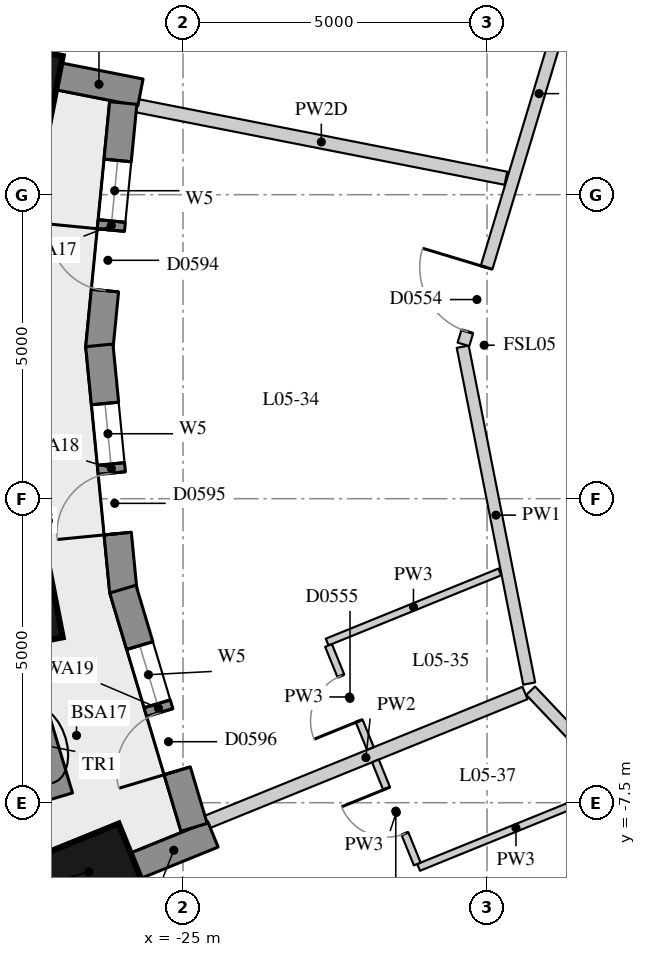
"""IFC4 building model, lengths in metres.
Left out: names, types, materials, properties, quantities, classifications, styles, units other than length and angle.
Written with IfcOpenShell. Run it as: python <this file> out.ifc"""

import sys

from ifc_helpers import new_model, si_unit, direction, frame, frame_2d, origin, origin_2d, place, context, subcontext, project, spatial, rectangle, extrude, element, fill, save


model = new_model("IFC4")
c1 = context("Model", 3, precision=1e-05, world=origin(), true_north=direction((0.0, 1.0)))
c2 = subcontext(c1, "Body", "Model", "MODEL_VIEW")
j1 = project(units=[si_unit("LENGTHUNIT", "METRE"), si_unit("PLANEANGLEUNIT", "RADIAN")], contexts=[c1])
p1 = place(None, origin())
s1 = spatial("IfcSite", under=j1, at=p1, CompositionType="ELEMENT")
p2 = place(p1, origin())
s2 = spatial("IfcBuilding", under=s1, at=p2, CompositionType="ELEMENT")
p3 = place(p2, frame((0.0, 0.0, 25.0)))
s3 = spatial("IfcBuildingStorey", under=s2, at=p3, CompositionType="ELEMENT", Elevation=25.0)
for number, where, z_axis, x_axis in (
    (1, (-27.821, 4.385, 0.0), (0.0, 0.0, 1.0), (-0.981, 0.193, 0.0)),
    (2, (-27.821, -4.385, 0.0), (0.0, 0.0, 1.0), (-0.981, -0.193, 0.0)),
    (3, (-26.546, -8.636, 0.0), (0.0, 0.0, 1.0), (-0.927, -0.376, 0.0)),
):
    element("IfcColumn", number, at=place(p3, frame(where, z_axis=z_axis, x_axis=x_axis)), inside=s3, PredefinedType="COLUMN", context=c2, shape_type="SweptSolid", body=[
        extrude(rectangle(XDim=1.5, YDim=1.1, at=origin_2d()), origin(), (0.0, 0.0, 1.0), 3.3),
    ])
p4 = place(p3, frame((-27.064, 4.45, 0.0), z_axis=(0.0, 0.0, 1.0), x_axis=(0.98123042829, -0.192838913596, 0.0)))
e4 = element("IfcWall", 4, at=p4, inside=s3, PredefinedType="SOLIDWALL", context=c2, shape_type="SweptSolid", body=[
    extrude(rectangle(XDim=1.39, YDim=0.45, at=frame_2d((0.695, 0.0))), origin(), (0.0, 0.0, 1.0), 2.47),
])
p5 = place(p3, frame((-25.796, -8.544, 0.0), z_axis=(0.0, 0.0, 1.0), x_axis=(0.926575599743, 0.376108572039, 0.0)))
e5 = element("IfcWall", 5, at=p5, inside=s3, PredefinedType="SOLIDWALL", context=c2, shape_type="SweptSolid", body=[
    extrude(rectangle(XDim=1.39, YDim=0.45, at=frame_2d((0.695, 0.0))), origin(), (0.0, 0.0, 1.0), 3.02),
])
p6 = place(p3, frame((-25.983, 4.008, 0.0), z_axis=(0.0, 0.0, 1.0), x_axis=(-0.097133468736, -0.995271364629, 0.0)))
e6 = element("IfcWall", 6, at=p6, inside=s3, PredefinedType="SOLIDWALL", context=c2, shape_type="SweptSolid", body=[
    extrude(rectangle(XDim=4.049, YDim=0.45, at=frame_2d((2.024, 0.0))), origin(), (0.0, 0.0, 1.0), 3.02),
])
p7 = place(p6, frame((0.949, 0.0, 0.4)))
e7 = element("IfcOpeningElement", 7, at=p7, cuts=e6, PredefinedType="OPENING", context=c2, shape_type="SweptSolid", body=[
    extrude(rectangle(XDim=1.0, YDim=1.75, at=frame_2d((0.5, 0.875))), frame((0.0, 0.235, 0.0), z_axis=(0.0, -1.0, 0.0), x_axis=(1.0, 0.0, 0.0)), (0.0, 0.0, 1.0), 0.47),
])
p8 = place(p6, frame((2.1, 0.0, 0.0)))
e8 = element("IfcOpeningElement", 8, at=p8, cuts=e6, PredefinedType="OPENING", context=c2, shape_type="SweptSolid", body=[
    extrude(rectangle(XDim=1.0, YDim=2.15, at=frame_2d((0.5, 1.075))), frame((0.0, 0.235, 0.0), z_axis=(0.0, -1.0, 0.0), x_axis=(1.0, 0.0, 0.0)), (0.0, 0.0, 1.0), 0.47),
])
p9 = place(p3, frame((-26.376, 0.022, 0.0), z_axis=(0.0, 0.0, 1.0), x_axis=(0.097092719726, -0.995275340685, 0.0)))
e9 = element("IfcWall", 9, at=p9, inside=s3, PredefinedType="SOLIDWALL", context=c2, shape_type="SweptSolid", body=[
    extrude(rectangle(XDim=4.071, YDim=0.45, at=frame_2d((2.036, 0.0))), origin(), (0.0, 0.0, 1.0), 3.02),
])
p10 = place(p9, frame((0.96, 0.0, 0.4)))
e10 = element("IfcOpeningElement", 10, at=p10, cuts=e9, PredefinedType="OPENING", context=c2, shape_type="SweptSolid", body=[
    extrude(rectangle(XDim=1.0, YDim=1.75, at=frame_2d((0.5, 0.875))), frame((0.0, 0.235, 0.0), z_axis=(0.0, -1.0, 0.0), x_axis=(1.0, 0.0, 0.0)), (0.0, 0.0, 1.0), 0.47),
])
p11 = place(p9, frame((2.111, 0.0, 0.0)))
e11 = element("IfcOpeningElement", 11, at=p11, cuts=e9, PredefinedType="OPENING", context=c2, shape_type="SweptSolid", body=[
    extrude(rectangle(XDim=1.0, YDim=2.15, at=frame_2d((0.5, 1.075))), frame((0.0, 0.235, 0.0), z_axis=(0.0, -1.0, 0.0), x_axis=(1.0, 0.0, 0.0)), (0.0, 0.0, 1.0), 0.47),
])
p12 = place(p3, frame((-25.989, -3.987, 0.0), z_axis=(0.0, 0.0, 1.0), x_axis=(0.286427456555, -0.958101932015, 0.0)))
e12 = element("IfcWall", 12, at=p12, inside=s3, PredefinedType="SOLIDWALL", context=c2, shape_type="SweptSolid", body=[
    extrude(rectangle(XDim=4.089, YDim=0.45, at=frame_2d((2.044, 0.0))), origin(), (0.0, 0.0, 1.0), 3.02),
])
p13 = place(p12, frame((0.969, 0.0, 0.4)))
e13 = element("IfcOpeningElement", 13, at=p13, cuts=e12, PredefinedType="OPENING", context=c2, shape_type="SweptSolid", body=[
    extrude(rectangle(XDim=1.0, YDim=1.75, at=frame_2d((0.5, 0.875))), frame((0.0, 0.235, 0.0), z_axis=(0.0, -1.0, 0.0), x_axis=(1.0, 0.0, 0.0)), (0.0, 0.0, 1.0), 0.47),
])
p14 = place(p12, frame((2.119, 0.0, 0.0)))
e14 = element("IfcOpeningElement", 14, at=p14, cuts=e12, PredefinedType="OPENING", context=c2, shape_type="SweptSolid", body=[
    extrude(rectangle(XDim=1.0, YDim=2.15, at=frame_2d((0.5, 1.075))), frame((0.0, 0.235, 0.0), z_axis=(0.0, -1.0, 0.0), x_axis=(1.0, 0.0, 0.0)), (0.0, 0.0, 1.0), 0.47),
])
p15 = place(p3, frame((-27.669, -5.715, 0.0), z_axis=(0.0, 0.0, 1.0), x_axis=(0.287024312863, -0.957923297465, 0.0)))
e15 = element("IfcWall", 15, at=p15, inside=s3, PredefinedType="USERDEFINED", context=c2, shape_type="SweptSolid", body=[
    extrude(rectangle(XDim=1.8, YDim=0.7, at=frame_2d((0.9, 0.0))), origin(), (0.0, 0.0, 1.0), 0.75),
])
p16 = place(p3, frame((-16.141, -8.974, 0.0), z_axis=(0.0, 0.0, 1.0), x_axis=(-0.687741683024, 0.725955492735, 0.0)))
e16 = element("IfcWall", 16, at=p16, inside=s3, PredefinedType="PARTITIONING", context=c2, shape_type="SweptSolid", body=[
    extrude(rectangle(XDim=4.568, YDim=0.2, at=frame_2d((2.284, 0.0))), origin(), (0.0, 0.0, 1.0), 3.02),
])
p17 = place(p3, frame((-19.306, -5.541, 0.0), z_axis=(0.0, 0.0, 1.0), x_axis=(-0.193671356151, 0.981066463501, 0.0)))
e17 = element("IfcWall", 17, at=p17, inside=s3, PredefinedType="PARTITIONING", context=c2, shape_type="SweptSolid", body=[
    extrude(rectangle(XDim=5.647, YDim=0.2, at=frame_2d((2.824, 0.0))), origin(), (0.0, 0.0, 1.0), 3.02),
])
p18 = place(p3, frame((-20.388, 0.038, 0.0), z_axis=(0.0, 0.0, 1.0), x_axis=(0.288600779805, 0.957449523419, 0.0)))
e18 = element("IfcWall", 18, at=p18, inside=s3, PredefinedType="PARTITIONING", context=c2, shape_type="SweptSolid", body=[
    extrude(rectangle(XDim=8.615, YDim=0.2, at=frame_2d((4.308, 0.0))), origin(), (0.0, 0.0, 1.0), 3.02),
])
p19 = place(p18, frame((7.295, 0.0, 0.0)))
e19 = element("IfcOpeningElement", 19, at=p19, cuts=e18, PredefinedType="OPENING", context=c2, shape_type="SweptSolid", body=[
    extrude(rectangle(XDim=1.1, YDim=2.1, at=frame_2d((0.55, 1.05))), frame((0.0, 0.11, 0.0), z_axis=(0.0, -1.0, 0.0), x_axis=(1.0, 0.0, 0.0)), (0.0, 0.0, 1.0), 0.22),
])
p20 = place(p18, frame((0.22, 0.0, 0.0)))
e20 = element("IfcOpeningElement", 20, at=p20, cuts=e18, PredefinedType="OPENING", context=c2, shape_type="SweptSolid", body=[
    extrude(rectangle(XDim=1.1, YDim=2.1, at=frame_2d((0.55, 1.05))), frame((0.0, 0.11, 0.0), z_axis=(0.0, -1.0, 0.0), x_axis=(1.0, 0.0, 0.0)), (0.0, 0.0, 1.0), 0.22),
])
p21 = place(p3, frame((-25.761, 3.964, 0.0), z_axis=(0.0, 0.0, 1.0), x_axis=(0.981209888948, -0.192943395406, 0.0)))
e21 = element("IfcWall", 21, at=p21, inside=s3, PredefinedType="PARTITIONING", context=c2, shape_type="SweptSolid", body=[
    extrude(rectangle(XDim=6.188, YDim=0.22, at=frame_2d((3.094, 0.0))), origin(), (0.0, 0.0, 1.0), 2.47),
])
p22 = place(p3, frame((-24.608, -7.82, 0.0), z_axis=(0.0, 0.0, 1.0), x_axis=(0.926565467624, 0.376133532415, 0.0)))
e22 = element("IfcWall", 22, at=p22, inside=s3, PredefinedType="PARTITIONING", context=c2, shape_type="SweptSolid", body=[
    extrude(rectangle(XDim=5.648, YDim=0.22, at=frame_2d((2.824, 0.0))), origin(), (0.0, 0.0, 1.0), 3.02),
])
p23 = place(p3, frame((-19.79, -3.705, 0.0), z_axis=(0.0, 0.0, 1.0), x_axis=(-0.926585481443, -0.37608422671, 0.0)))
e23 = element("IfcWall", 23, at=p23, inside=s3, PredefinedType="PARTITIONING", context=c2, shape_type="SweptSolid", body=[
    extrude(rectangle(XDim=3.064, YDim=0.12, at=frame_2d((1.532, 0.0))), origin(), (0.0, 0.0, 1.0), 3.02),
])
p24 = place(p3, frame((-17.924, -7.264, 0.0), z_axis=(0.0, 0.0, 1.0), x_axis=(-0.926548953408, -0.376174210891, 0.0)))
e24 = element("IfcWall", 24, at=p24, inside=s3, PredefinedType="PARTITIONING", context=c2, shape_type="SweptSolid", body=[
    extrude(rectangle(XDim=3.455, YDim=0.12, at=frame_2d((1.727, 0.0))), origin(), (0.0, 0.0, 1.0), 3.02),
])
p25 = place(p3, frame((-22.607, -4.913, 0.0), z_axis=(0.0, 0.0, 1.0), x_axis=(0.376216010002, -0.92653198208, 0.0)))
e25 = element("IfcWall", 25, at=p25, inside=s3, PredefinedType="PARTITIONING", context=c2, shape_type="SweptSolid", body=[
    extrude(rectangle(XDim=1.83, YDim=0.12, at=frame_2d((0.915, 0.0))), origin(), (0.0, 0.0, 1.0), 3.02),
])
p26 = place(p25, frame((0.54, 0.0, 0.0)))
e26 = element("IfcOpeningElement", 26, at=p26, cuts=e25, PredefinedType="OPENING", context=c2, shape_type="SweptSolid", body=[
    extrude(rectangle(XDim=0.8, YDim=2.1, at=frame_2d((0.4, 1.05))), frame((0.0, 0.07, 0.0), z_axis=(0.0, -1.0, 0.0), x_axis=(1.0, 0.0, 0.0)), (0.0, 0.0, 1.0), 0.14),
])
p27 = place(p3, frame((-21.147, -8.508, 0.0), z_axis=(0.0, 0.0, 1.0), x_axis=(-0.376216010002, 0.92653198208, 0.0)))
e27 = element("IfcWall", 27, at=p27, inside=s3, PredefinedType="PARTITIONING", context=c2, shape_type="SweptSolid", body=[
    extrude(rectangle(XDim=1.83, YDim=0.12, at=frame_2d((0.915, 0.0))), origin(), (0.0, 0.0, 1.0), 3.02),
])
p28 = place(p27, frame((0.54, 0.0, 0.0)))
e28 = element("IfcOpeningElement", 28, at=p28, cuts=e27, PredefinedType="OPENING", context=c2, shape_type="SweptSolid", body=[
    extrude(rectangle(XDim=0.8, YDim=2.1, at=frame_2d((0.4, 1.05))), frame((0.0, 0.07, 0.0), z_axis=(0.0, -1.0, 0.0), x_axis=(1.0, 0.0, 0.0)), (0.0, 0.0, 1.0), 0.14),
])
p29 = place(p7, origin())
e29 = element("IfcWindow", 29, at=p29, inside=s3, PartitioningType="SINGLE_PANEL", PredefinedType="WINDOW", context=c2, shape_type="SweptSolid", body=[
    extrude(rectangle(XDim=1.0, YDim=1.75, at=frame_2d((0.5, 0.875))), frame((0.0, 0.035, 0.0), z_axis=(0.0, -1.0, 0.0), x_axis=(1.0, 0.0, 0.0)), (0.0, 0.0, 1.0), 0.06),
])
fill(e7, e29)
p30 = place(p8, frame((1.0, 0.0, 0.0), z_axis=(0.0, 0.0, 1.0), x_axis=(-1.0, 0.0, 0.0)))
e30 = element("IfcDoor", 30, at=p30, inside=s3, OperationType="SINGLE_SWING_RIGHT", PredefinedType="DOOR", context=c2, shape_type="SweptSolid", body=[
    extrude(rectangle(XDim=1.0, YDim=2.15, at=frame_2d((0.5, 1.075))), frame((0.0, 0.075, 0.0), z_axis=(0.0, -1.0, 0.0), x_axis=(1.0, 0.0, 0.0)), (0.0, 0.0, 1.0), 0.05),
])
fill(e8, e30)
p31 = place(p10, origin())
e31 = element("IfcWindow", 31, at=p31, inside=s3, PartitioningType="SINGLE_PANEL", PredefinedType="WINDOW", context=c2, shape_type="SweptSolid", body=[
    extrude(rectangle(XDim=1.0, YDim=1.75, at=frame_2d((0.5, 0.875))), frame((0.0, 0.035, 0.0), z_axis=(0.0, -1.0, 0.0), x_axis=(1.0, 0.0, 0.0)), (0.0, 0.0, 1.0), 0.06),
])
fill(e10, e31)
p32 = place(p11, frame((1.0, 0.0, 0.0), z_axis=(0.0, 0.0, 1.0), x_axis=(-1.0, 0.0, 0.0)))
e32 = element("IfcDoor", 32, at=p32, inside=s3, OperationType="SINGLE_SWING_LEFT", PredefinedType="DOOR", context=c2, shape_type="SweptSolid", body=[
    extrude(rectangle(XDim=1.0, YDim=2.15, at=frame_2d((0.5, 1.075))), frame((0.0, 0.075, 0.0), z_axis=(0.0, -1.0, 0.0), x_axis=(1.0, 0.0, 0.0)), (0.0, 0.0, 1.0), 0.05),
])
fill(e11, e32)
p33 = place(p13, origin())
e33 = element("IfcWindow", 33, at=p33, inside=s3, PartitioningType="SINGLE_PANEL", PredefinedType="WINDOW", context=c2, shape_type="SweptSolid", body=[
    extrude(rectangle(XDim=1.0, YDim=1.75, at=frame_2d((0.5, 0.875))), frame((0.0, 0.035, 0.0), z_axis=(0.0, -1.0, 0.0), x_axis=(1.0, 0.0, 0.0)), (0.0, 0.0, 1.0), 0.06),
])
fill(e13, e33)
p34 = place(p14, frame((1.0, 0.0, 0.0), z_axis=(0.0, 0.0, 1.0), x_axis=(-1.0, 0.0, 0.0)))
e34 = element("IfcDoor", 34, at=p34, inside=s3, OperationType="SINGLE_SWING_LEFT", PredefinedType="DOOR", context=c2, shape_type="SweptSolid", body=[
    extrude(rectangle(XDim=1.0, YDim=2.15, at=frame_2d((0.5, 1.075))), frame((0.0, 0.075, 0.0), z_axis=(0.0, -1.0, 0.0), x_axis=(1.0, 0.0, 0.0)), (0.0, 0.0, 1.0), 0.05),
])
fill(e14, e34)
p35 = place(p20, origin())
e35 = element("IfcDoor", 35, at=p35, inside=s3, OperationType="SINGLE_SWING_RIGHT", PredefinedType="DOOR", context=c2, shape_type="SweptSolid", body=[
    extrude(rectangle(XDim=1.1, YDim=2.1, at=frame_2d((0.55, 1.05))), frame((0.0, 0.025, 0.0), z_axis=(0.0, -1.0, 0.0), x_axis=(1.0, 0.0, 0.0)), (0.0, 0.0, 1.0), 0.05),
])
fill(e20, e35)
p36 = place(p26, origin())
e36 = element("IfcDoor", 36, at=p36, inside=s3, OperationType="SINGLE_SWING_LEFT", PredefinedType="DOOR", context=c2, shape_type="SweptSolid", body=[
    extrude(rectangle(XDim=0.8, YDim=2.1, at=frame_2d((0.4, 1.05))), frame((0.0, 0.025, 0.0), z_axis=(0.0, -1.0, 0.0), x_axis=(1.0, 0.0, 0.0)), (0.0, 0.0, 1.0), 0.05),
])
fill(e26, e36)
p37 = place(p28, origin())
e37 = element("IfcDoor", 37, at=p37, inside=s3, OperationType="SINGLE_SWING_RIGHT", PredefinedType="DOOR", context=c2, shape_type="SweptSolid", body=[
    extrude(rectangle(XDim=0.8, YDim=2.1, at=frame_2d((0.4, 1.05))), frame((0.0, 0.025, 0.0), z_axis=(0.0, -1.0, 0.0), x_axis=(1.0, 0.0, 0.0)), (0.0, 0.0, 1.0), 0.05),
])
fill(e28, e37)
save(model, sys.argv[1])
